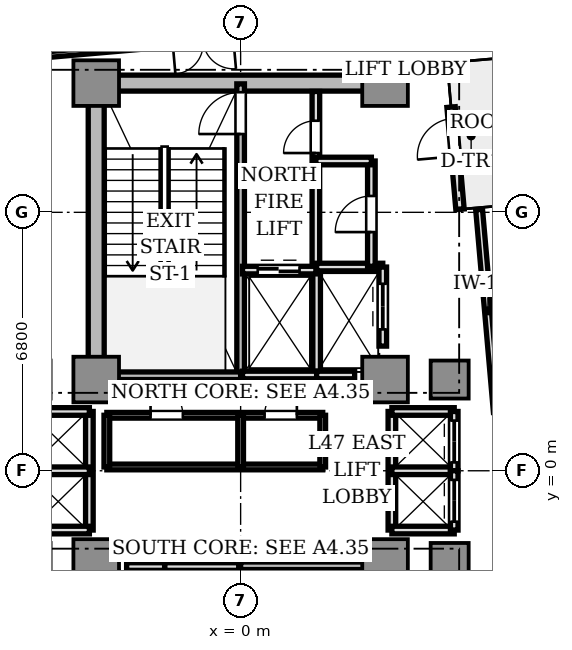
"""IFC4 building model, lengths in metres.
Left out: names, types, materials, properties, quantities, classifications, styles, units other than length and angle.
Written with IfcOpenShell. Run it as: python <this file> out.ifc"""

import sys

from ifc_helpers import new_model, si_unit, direction, frame, frame_2d, origin, origin_2d, place, context, subcontext, project, spatial, rectangle, extrude, source, transform, mapped, element, fill, save


model = new_model("IFC4")
c1 = context("Model", 3, precision=1e-05, world=origin(), true_north=direction((0.0, 1.0)))
c2 = subcontext(c1, "Body", "Model", "MODEL_VIEW")
j1 = project(units=[si_unit("LENGTHUNIT", "METRE"), si_unit("PLANEANGLEUNIT", "RADIAN")], contexts=[c1])
p1 = place(None, origin())
s1 = spatial("IfcSite", under=j1, at=p1, CompositionType="ELEMENT")
p2 = place(p1, origin())
s2 = spatial("IfcBuilding", under=s1, at=p2, CompositionType="ELEMENT")
p3 = place(p2, frame((0.0, 0.0, 170.7)))
s3 = spatial("IfcBuildingStorey", under=s2, at=p3, CompositionType="ELEMENT", Elevation=170.7)
p4 = place(p3, frame((-3.55, 10.2, 0.0), z_axis=(0.0, 0.0, 1.0), x_axis=(1.0, 0.0, 0.0)))
e1 = element("IfcWall", 1, at=p4, inside=s3, PredefinedType="SHEAR", context=c2, shape_type="SweptSolid", body=[
    extrude(rectangle(XDim=7.1, YDim=0.42, at=frame_2d((3.55, 0.0))), origin(), (0.0, 0.0, 1.0), 4.26),
])
p5 = place(p3, frame((-3.8, 2.85, 0.0), z_axis=(0.0, 0.0, 1.0), x_axis=(0.0, 1.0, 0.0)))
e2 = element("IfcWall", 2, at=p5, inside=s3, PredefinedType="SHEAR", context=c2, shape_type="SweptSolid", body=[
    extrude(rectangle(XDim=6.9, YDim=0.42, at=frame_2d((3.45, 0.0))), origin(), (0.0, 0.0, 1.0), 4.26),
])
m1 = source(origin(), c2, "Body", "SweptSolid", [
    extrude(rectangle(XDim=1.2, YDim=1.2, at=origin_2d()), origin(), (0.0, 0.0, 1.0), 4.26),
])
for number, where, z_axis, x_axis in (
    (3, (-3.8, 2.4, 0.0), (0.0, 0.0, 1.0), (1.0, 0.0, 0.0)),
    (4, (3.8, 2.4, 0.0), (0.0, 0.0, 1.0), (1.0, 0.0, 0.0)),
    (5, (-3.8, 10.2, 0.0), (0.0, 0.0, 1.0), (1.0, 0.0, 0.0)),
    (6, (3.8, 10.2, 0.0), (0.0, 0.0, 1.0), (1.0, 0.0, 0.0)),
    (7, (-3.8, -2.4, 0.0), (0.0, 0.0, 1.0), (1.0, 0.0, 0.0)),
    (8, (3.8, -2.4, 0.0), (0.0, 0.0, 1.0), (1.0, 0.0, 0.0)),
):
    element("IfcColumn", number, at=place(p3, frame(where, z_axis=z_axis, x_axis=x_axis)), inside=s3, PredefinedType="COLUMN", context=c2, shape_type="MappedRepresentation", body=[
        mapped(m1, transform((0.0, 0.0, 0.0), scale=1.0)),
    ])
m2 = source(origin(), c2, "Body", "SweptSolid", [
    extrude(rectangle(XDim=1.0, YDim=1.0, at=origin_2d()), origin(), (0.0, 0.0, 1.0), 4.26),
])
for number, where, z_axis, x_axis in (
    (9, (5.5, 2.4, 0.0), (0.0, 0.0, 1.0), (1.0, 0.0, 0.0)),
    (10, (5.5, -2.4, 0.0), (0.0, 0.0, 1.0), (1.0, 0.0, 0.0)),
):
    element("IfcColumn", number, at=place(p3, frame(where, z_axis=z_axis, x_axis=x_axis)), inside=s3, PredefinedType="COLUMN", context=c2, shape_type="MappedRepresentation", body=[
        mapped(m2, transform((0.0, 0.0, 0.0), scale=1.0)),
    ])
p6 = place(p3, frame((5.772, 6.879, 0.0), z_axis=(0.0, 0.0, 1.0), x_axis=(-0.087168071984, 0.996193619346, 0.0)))
e11 = element("IfcWall", 11, at=p6, inside=s3, PredefinedType="STANDARD", context=c2, shape_type="SweptSolid", body=[
    extrude(rectangle(XDim=2.7, YDim=0.22, at=frame_2d((1.35, 0.0))), origin(), (0.0, 0.0, 1.0), 4.26),
])
p7 = place(p6, frame((1.4, 0.0, 0.0)))
e12 = element("IfcOpeningElement", 12, at=p7, cuts=e11, PredefinedType="OPENING", context=c2, shape_type="SweptSolid", body=[
    extrude(rectangle(XDim=1.0, YDim=2.2, at=frame_2d((0.5, 1.1))), frame((0.0, 0.12, 0.0), z_axis=(0.0, -1.0, 0.0), x_axis=(1.0, 0.0, 0.0)), (0.0, 0.0, 1.0), 0.24),
])
p8 = place(p3, frame((0.0, 2.5, 0.0), z_axis=(0.0, 0.0, 1.0), x_axis=(0.0, 1.0, 0.0)))
e13 = element("IfcWall", 13, at=p8, inside=s3, PredefinedType="SOLIDWALL", context=c2, shape_type="SweptSolid", body=[
    extrude(rectangle(XDim=7.68, YDim=0.2, at=frame_2d((3.84, 0.0))), origin(), (0.0, 0.0, 1.0), 4.26),
])
p9 = place(p8, frame((6.36, 0.0, 0.0)))
e14 = element("IfcOpeningElement", 14, at=p9, cuts=e13, PredefinedType="OPENING", context=c2, shape_type="SweptSolid", body=[
    extrude(rectangle(XDim=1.1, YDim=2.15, at=frame_2d((0.55, 1.075))), frame((0.0, 0.11, 0.0), z_axis=(0.0, -1.0, 0.0), x_axis=(1.0, 0.0, 0.0)), (0.0, 0.0, 1.0), 0.22),
])
p10 = place(p3, frame((-3.72, 2.5, 0.0), z_axis=(0.0, 0.0, 1.0), x_axis=(1.0, 0.0, 0.0)))
e15 = element("IfcWall", 15, at=p10, inside=s3, PredefinedType="SOLIDWALL", context=c2, shape_type="SweptSolid", body=[
    extrude(rectangle(XDim=3.72, YDim=0.2, at=frame_2d((1.86, 0.0))), origin(), (0.0, 0.0, 1.0), 4.26),
])
p11 = place(p3, frame((0.0, -10.18, 0.0), z_axis=(0.0, 0.0, 1.0), x_axis=(0.0, 1.0, 0.0)))
e16 = element("IfcWall", 16, at=p11, inside=s3, PredefinedType="SOLIDWALL", context=c2, shape_type="SweptSolid", body=[
    extrude(rectangle(XDim=7.68, YDim=0.2, at=frame_2d((3.84, 0.0))), origin(), (0.0, 0.0, 1.0), 4.26),
])
p12 = place(p11, frame((0.28, 0.0, 0.0)))
e17 = element("IfcOpeningElement", 17, at=p12, cuts=e16, PredefinedType="OPENING", context=c2, shape_type="SweptSolid", body=[
    extrude(rectangle(XDim=1.1, YDim=2.15, at=frame_2d((0.55, 1.075))), frame((0.0, 0.11, 0.0), z_axis=(0.0, -1.0, 0.0), x_axis=(1.0, 0.0, 0.0)), (0.0, 0.0, 1.0), 0.22),
])
p13 = place(p3, frame((0.0, -2.5, 0.0), z_axis=(0.0, 0.0, 1.0), x_axis=(1.0, 0.0, 0.0)))
e18 = element("IfcWall", 18, at=p13, inside=s3, PredefinedType="SOLIDWALL", context=c2, shape_type="SweptSolid", body=[
    extrude(rectangle(XDim=3.72, YDim=0.2, at=frame_2d((1.86, 0.0))), origin(), (0.0, 0.0, 1.0), 4.26),
])
p14 = place(p3, frame((1.98, 5.32, 0.0), z_axis=(0.0, 0.0, 1.0), x_axis=(0.0, 1.0, 0.0)))
e19 = element("IfcWall", 19, at=p14, inside=s3, PredefinedType="SOLIDWALL", context=c2, shape_type="SweptSolid", body=[
    extrude(rectangle(XDim=4.66, YDim=0.2, at=frame_2d((2.33, 0.0))), origin(), (0.0, 0.0, 1.0), 3.81),
])
p15 = place(p14, frame((3.04, 0.0, 0.0)))
e20 = element("IfcOpeningElement", 20, at=p15, cuts=e19, PredefinedType="OPENING", context=c2, shape_type="SweptSolid", body=[
    extrude(rectangle(XDim=0.85, YDim=2.1, at=frame_2d((0.425, 1.05))), frame((0.0, 0.11, 0.0), z_axis=(0.0, -1.0, 0.0), x_axis=(1.0, 0.0, 0.0)), (0.0, 0.0, 1.0), 0.22),
])
p16 = place(p3, frame((2.0, 2.5, 0.0), z_axis=(0.0, 0.0, 1.0), x_axis=(0.0, 1.0, 0.0)))
e21 = element("IfcWall", 21, at=p16, inside=s3, PredefinedType="SOLIDWALL", context=c2, shape_type="SweptSolid", body=[
    extrude(rectangle(XDim=2.78, YDim=0.2, at=frame_2d((1.39, 0.0))), origin(), (0.0, 0.0, 1.0), 3.81),
])
p17 = place(p3, frame((0.05, 2.52, 0.0), z_axis=(0.0, 0.0, 1.0), x_axis=(1.0, 0.0, 0.0)))
e22 = element("IfcWall", 22, at=p17, inside=s3, PredefinedType="SOLIDWALL", context=c2, shape_type="SweptSolid", body=[
    extrude(rectangle(XDim=1.95, YDim=0.2, at=frame_2d((0.975, 0.0))), origin(), (0.0, 0.0, 1.0), 3.81),
])
p18 = place(p3, frame((0.05, 5.28, 0.0), z_axis=(0.0, 0.0, 1.0), x_axis=(1.0, 0.0, 0.0)))
e23 = element("IfcWall", 23, at=p18, inside=s3, PredefinedType="SOLIDWALL", context=c2, shape_type="SweptSolid", body=[
    extrude(rectangle(XDim=1.93, YDim=0.2, at=frame_2d((0.965, 0.0))), origin(), (0.0, 0.0, 1.0), 3.81),
])
p19 = place(p18, frame((0.4, 0.0, 0.0)))
e24 = element("IfcOpeningElement", 24, at=p19, cuts=e23, PredefinedType="OPENING", context=c2, shape_type="SweptSolid", body=[
    extrude(rectangle(XDim=1.1, YDim=2.2, at=frame_2d((0.55, 1.1))), frame((0.0, 0.11, 0.0), z_axis=(0.0, -1.0, 0.0), x_axis=(1.0, 0.0, 0.0)), (0.0, 0.0, 1.0), 0.22),
])
p20 = place(p3, frame((-2.0, -5.28, 0.0), z_axis=(0.0, 0.0, 1.0), x_axis=(0.0, 1.0, 0.0)))
e25 = element("IfcWall", 25, at=p20, inside=s3, PredefinedType="SOLIDWALL", context=c2, shape_type="SweptSolid", body=[
    extrude(rectangle(XDim=2.78, YDim=0.2, at=frame_2d((1.39, 0.0))), origin(), (0.0, 0.0, 1.0), 3.81),
])
p21 = place(p3, frame((-2.0, -2.52, 0.0), z_axis=(0.0, 0.0, 1.0), x_axis=(1.0, 0.0, 0.0)))
e26 = element("IfcWall", 26, at=p21, inside=s3, PredefinedType="SOLIDWALL", context=c2, shape_type="SweptSolid", body=[
    extrude(rectangle(XDim=1.95, YDim=0.2, at=frame_2d((0.975, 0.0))), origin(), (0.0, 0.0, 1.0), 3.81),
])
p22 = place(p3, frame((2.0, 2.52, 0.0), z_axis=(0.0, 0.0, 1.0), x_axis=(1.0, 0.0, 0.0)))
e27 = element("IfcWall", 27, at=p22, inside=s3, PredefinedType="SOLIDWALL", context=c2, shape_type="SweptSolid", body=[
    extrude(rectangle(XDim=1.0, YDim=0.2, at=frame_2d((0.5, 0.0))), origin(), (0.0, 0.0, 1.0), 3.81),
])
p23 = place(p3, frame((2.0, 5.36, 0.0), z_axis=(0.0, 0.0, 1.0), x_axis=(1.0, 0.0, 0.0)))
e28 = element("IfcWall", 28, at=p23, inside=s3, PredefinedType="SOLIDWALL", context=c2, shape_type="SweptSolid", body=[
    extrude(rectangle(XDim=1.74, YDim=0.2, at=frame_2d((0.87, 0.0))), origin(), (0.0, 0.0, 1.0), 3.81),
])
p24 = place(p3, frame((3.74, 3.28, 0.0), z_axis=(0.0, 0.0, 1.0), x_axis=(0.0, 1.0, 0.0)))
e29 = element("IfcWall", 29, at=p24, inside=s3, PredefinedType="SOLIDWALL", context=c2, shape_type="SweptSolid", body=[
    extrude(rectangle(XDim=2.08, YDim=0.2, at=frame_2d((1.04, 0.0))), origin(), (0.0, 0.0, 1.0), 3.81),
])
p25 = place(p24, frame((0.44, 0.0, 0.0)))
e30 = element("IfcOpeningElement", 30, at=p25, cuts=e29, PredefinedType="OPENING", context=c2, shape_type="SweptSolid", body=[
    extrude(rectangle(XDim=1.2, YDim=2.2, at=frame_2d((0.6, 1.1))), frame((0.0, 0.11, 0.0), z_axis=(0.0, -1.0, 0.0), x_axis=(1.0, 0.0, 0.0)), (0.0, 0.0, 1.0), 0.22),
])
p26 = place(p3, frame((-3.0, -2.52, 0.0), z_axis=(0.0, 0.0, 1.0), x_axis=(1.0, 0.0, 0.0)))
e31 = element("IfcWall", 31, at=p26, inside=s3, PredefinedType="SOLIDWALL", context=c2, shape_type="SweptSolid", body=[
    extrude(rectangle(XDim=1.0, YDim=0.2, at=frame_2d((0.5, 0.0))), origin(), (0.0, 0.0, 1.0), 3.81),
])
p27 = place(p3, frame((3.98, -1.56, 0.0), z_axis=(0.0, 0.0, 1.0), x_axis=(0.0, 1.0, 0.0)))
e32 = element("IfcWall", 32, at=p27, inside=s3, PredefinedType="SOLIDWALL", context=c2, shape_type="SweptSolid", body=[
    extrude(rectangle(XDim=3.12, YDim=0.2, at=frame_2d((1.56, 0.0))), origin(), (0.0, 0.0, 1.0), 3.43),
])
for number, where, z_axis, x_axis in (
    (33, (3.98, 1.56, 0.0), (0.0, 0.0, 1.0), (1.0, 0.0, 0.0)),
    (34, (3.98, -1.56, 0.0), (0.0, 0.0, 1.0), (1.0, 0.0, 0.0)),
    (35, (3.98, 0.0, 0.0), (0.0, 0.0, 1.0), (1.0, 0.0, 0.0)),
):
    element("IfcWall", number, at=place(p3, frame(where, z_axis=z_axis, x_axis=x_axis)), inside=s3, PredefinedType="SOLIDWALL", context=c2, shape_type="SweptSolid", body=[
        extrude(rectangle(XDim=1.64, YDim=0.2, at=frame_2d((0.82, 0.0))), origin(), (0.0, 0.0, 1.0), 3.81),
    ])
p28 = place(p3, frame((5.62, 0.0, 0.0), z_axis=(0.0, 0.0, 1.0), x_axis=(0.0, 1.0, 0.0)))
e36 = element("IfcWall", 36, at=p28, inside=s3, PredefinedType="SOLIDWALL", context=c2, shape_type="SweptSolid", body=[
    extrude(rectangle(XDim=1.56, YDim=0.2, at=frame_2d((0.78, 0.0))), origin(), (0.0, 0.0, 1.0), 3.81),
])
p29 = place(p28, frame((0.22, 0.0, 0.0)))
e37 = element("IfcOpeningElement", 37, at=p29, cuts=e36, PredefinedType="OPENING", context=c2, shape_type="SweptSolid", body=[
    extrude(rectangle(XDim=1.1, YDim=2.2, at=frame_2d((0.55, 1.1))), frame((0.0, 0.11, 0.0), z_axis=(0.0, -1.0, 0.0), x_axis=(1.0, 0.0, 0.0)), (0.0, 0.0, 1.0), 0.22),
])
p30 = place(p3, frame((5.62, -1.56, 0.0), z_axis=(0.0, 0.0, 1.0), x_axis=(0.0, 1.0, 0.0)))
e38 = element("IfcWall", 38, at=p30, inside=s3, PredefinedType="SOLIDWALL", context=c2, shape_type="SweptSolid", body=[
    extrude(rectangle(XDim=1.56, YDim=0.2, at=frame_2d((0.78, 0.0))), origin(), (0.0, 0.0, 1.0), 3.81),
])
p31 = place(p30, frame((0.22, 0.0, 0.0)))
e39 = element("IfcOpeningElement", 39, at=p31, cuts=e38, PredefinedType="OPENING", context=c2, shape_type="SweptSolid", body=[
    extrude(rectangle(XDim=1.1, YDim=2.2, at=frame_2d((0.55, 1.1))), frame((0.0, 0.11, 0.0), z_axis=(0.0, -1.0, 0.0), x_axis=(1.0, 0.0, 0.0)), (0.0, 0.0, 1.0), 0.22),
])
p32 = place(p3, frame((-3.98, -1.56, 0.0), z_axis=(0.0, 0.0, 1.0), x_axis=(0.0, 1.0, 0.0)))
e40 = element("IfcWall", 40, at=p32, inside=s3, PredefinedType="SOLIDWALL", context=c2, shape_type="SweptSolid", body=[
    extrude(rectangle(XDim=3.12, YDim=0.2, at=frame_2d((1.56, 0.0))), origin(), (0.0, 0.0, 1.0), 3.43),
])
for number, where, z_axis, x_axis in (
    (41, (-5.62, 1.56, 0.0), (0.0, 0.0, 1.0), (1.0, 0.0, 0.0)),
    (42, (-5.62, -1.56, 0.0), (0.0, 0.0, 1.0), (1.0, 0.0, 0.0)),
    (43, (-5.62, 0.0, 0.0), (0.0, 0.0, 1.0), (1.0, 0.0, 0.0)),
):
    element("IfcWall", number, at=place(p3, frame(where, z_axis=z_axis, x_axis=x_axis)), inside=s3, PredefinedType="SOLIDWALL", context=c2, shape_type="SweptSolid", body=[
        extrude(rectangle(XDim=1.64, YDim=0.2, at=frame_2d((0.82, 0.0))), origin(), (0.0, 0.0, 1.0), 3.81),
    ])
p33 = place(p3, frame((3.44, 5.38, 0.0), z_axis=(0.0, 0.0, 1.0), x_axis=(0.0, 1.0, 0.0)))
e44 = element("IfcWall", 44, at=p33, inside=s3, PredefinedType="SOLIDWALL", context=c2, shape_type="SweptSolid", body=[
    extrude(rectangle(XDim=2.77, YDim=0.2, at=frame_2d((1.385, 0.0))), origin(), (0.0, 0.0, 1.0), 3.81),
])
p34 = place(p33, frame((0.9, 0.0, 0.0)))
e45 = element("IfcOpeningElement", 45, at=p34, cuts=e44, PredefinedType="OPENING", context=c2, shape_type="SweptSolid", body=[
    extrude(rectangle(XDim=0.95, YDim=2.15, at=frame_2d((0.475, 1.075))), frame((0.0, 0.11, 0.0), z_axis=(0.0, -1.0, 0.0), x_axis=(1.0, 0.0, 0.0)), (0.0, 0.0, 1.0), 0.22),
])
p35 = place(p3, frame((1.98, 8.15, 0.0), z_axis=(0.0, 0.0, 1.0), x_axis=(1.0, 0.0, 0.0)))
e46 = element("IfcWall", 46, at=p35, inside=s3, PredefinedType="SOLIDWALL", context=c2, shape_type="SweptSolid", body=[
    extrude(rectangle(XDim=1.46, YDim=0.2, at=frame_2d((0.73, 0.0))), origin(), (0.0, 0.0, 1.0), 3.81),
])
p36 = place(p3, frame((-3.52, 0.1, 0.0), z_axis=(0.0, 0.0, 1.0), x_axis=(1.0, 0.0, 0.0)))
e47 = element("IfcWall", 47, at=p36, inside=s3, PredefinedType="PARTITIONING", context=c2, shape_type="SweptSolid", body=[
    extrude(rectangle(XDim=5.68, YDim=0.15, at=frame_2d((2.84, 0.0))), origin(), (0.0, 0.0, 1.0), 3.81),
])
p37 = place(p3, frame((-3.52, 1.46, 0.0), z_axis=(0.0, 0.0, 1.0), x_axis=(1.0, 0.0, 0.0)))
e48 = element("IfcWall", 48, at=p37, inside=s3, PredefinedType="PARTITIONING", context=c2, shape_type="SweptSolid", body=[
    extrude(rectangle(XDim=5.68, YDim=0.15, at=frame_2d((2.84, 0.0))), origin(), (0.0, 0.0, 1.0), 3.81),
])
p38 = place(p37, frame((1.15, 0.0, 0.0)))
e49 = element("IfcOpeningElement", 49, at=p38, cuts=e48, PredefinedType="OPENING", context=c2, shape_type="SweptSolid", body=[
    extrude(rectangle(XDim=0.85, YDim=2.1, at=frame_2d((0.425, 1.05))), frame((0.0, 0.085, 0.0), z_axis=(0.0, -1.0, 0.0), x_axis=(1.0, 0.0, 0.0)), (0.0, 0.0, 1.0), 0.17),
])
p39 = place(p37, frame((4.15, 0.0, 0.0)))
e50 = element("IfcOpeningElement", 50, at=p39, cuts=e48, PredefinedType="OPENING", context=c2, shape_type="SweptSolid", body=[
    extrude(rectangle(XDim=0.85, YDim=2.1, at=frame_2d((0.425, 1.05))), frame((0.0, 0.085, 0.0), z_axis=(0.0, -1.0, 0.0), x_axis=(1.0, 0.0, 0.0)), (0.0, 0.0, 1.0), 0.17),
])
p40 = place(p3, frame((-3.52, 0.1, 0.0), z_axis=(0.0, 0.0, 1.0), x_axis=(0.0, 1.0, 0.0)))
e51 = element("IfcWall", 51, at=p40, inside=s3, PredefinedType="PARTITIONING", context=c2, shape_type="SweptSolid", body=[
    extrude(rectangle(XDim=1.36, YDim=0.15, at=frame_2d((0.68, 0.0))), origin(), (0.0, 0.0, 1.0), 3.43),
])
for number, where, z_axis, x_axis in (
    (52, (2.16, 0.1, 0.0), (0.0, 0.0, 1.0), (0.0, 1.0, 0.0)),
    (53, (0.0, 0.1, 0.0), (0.0, 0.0, 1.0), (0.0, 1.0, 0.0)),
):
    element("IfcWall", number, at=place(p3, frame(where, z_axis=z_axis, x_axis=x_axis)), inside=s3, PredefinedType="PARTITIONING", context=c2, shape_type="SweptSolid", body=[
        extrude(rectangle(XDim=1.36, YDim=0.15, at=frame_2d((0.68, 0.0))), origin(), (0.0, 0.0, 1.0), 3.81),
    ])
p41 = place(p3, frame((6.741, 1.543, 0.0), z_axis=(0.0, 0.0, 1.0), x_axis=(-0.087161289348, 0.996194212812, 0.0)))
e54 = element("IfcWall", 54, at=p41, inside=s3, PredefinedType="PARTITIONING", context=c2, shape_type="SweptSolid", body=[
    extrude(rectangle(XDim=5.35, YDim=0.18, at=frame_2d((2.675, 0.0))), origin(), (0.0, 0.0, 1.0), 3.81),
])
p42 = place(p3, frame((5.287, 11.856, 0.0), z_axis=(0.0, 0.0, 1.0), x_axis=(-0.996194790044, -0.087154691724, 0.0)))
e55 = element("IfcWall", 55, at=p42, inside=s3, PredefinedType="PARTITIONING", context=c2, shape_type="SweptSolid", body=[
    extrude(rectangle(XDim=12.6, YDim=0.15, at=frame_2d((6.3, 0.0))), origin(), (0.0, 0.0, 1.0), 3.81),
])
p43 = place(p42, frame((5.5, 0.0, 0.0)))
e56 = element("IfcOpeningElement", 56, at=p43, cuts=e55, PredefinedType="OPENING", context=c2, shape_type="SweptSolid", body=[
    extrude(rectangle(XDim=1.6, YDim=2.25, at=frame_2d((0.8, 1.125))), frame((0.0, 0.085, 0.0), z_axis=(0.0, -1.0, 0.0), x_axis=(1.0, 0.0, 0.0)), (0.0, 0.0, 1.0), 0.17),
])
m3 = source(origin(), c2, "Body", "SweptSolid", [
    extrude(rectangle(XDim=1.0, YDim=0.05, at=origin_2d()), origin(), (0.0, 0.0, 1.0), 2.2),
])
p44 = place(p7, frame((0.5, 0.0, 0.0)))
e57 = element("IfcDoor", 57, at=p44, inside=s3, OperationType="SINGLE_SWING_LEFT", PredefinedType="DOOR", context=c2, shape_type="MappedRepresentation", body=[
    mapped(m3, transform((0.0, 0.0, 0.0), scale=1.0)),
])
fill(e12, e57)
m4 = source(origin(), c2, "Body", "SweptSolid", [
    extrude(rectangle(XDim=1.1, YDim=0.05, at=origin_2d()), origin(), (0.0, 0.0, 1.0), 2.15),
])
p45 = place(p9, frame((0.55, 0.0, 0.0)))
e58 = element("IfcDoor", 58, at=p45, inside=s3, OperationType="SINGLE_SWING_LEFT", PredefinedType="DOOR", context=c2, shape_type="MappedRepresentation", body=[
    mapped(m4, transform((0.0, 0.0, 0.0), scale=1.0)),
])
fill(e14, e58)
m5 = source(origin(), c2, "Body", "SweptSolid", [
    extrude(rectangle(XDim=0.85, YDim=0.05, at=origin_2d()), origin(), (0.0, 0.0, 1.0), 2.1),
])
p46 = place(p15, frame((0.425, 0.0, 0.0)))
e59 = element("IfcDoor", 59, at=p46, inside=s3, OperationType="SINGLE_SWING_LEFT", PredefinedType="DOOR", context=c2, shape_type="MappedRepresentation", body=[
    mapped(m5, transform((0.0, 0.0, 0.0), scale=1.0)),
])
fill(e20, e59)
m6 = source(origin(), c2, "Body", "SweptSolid", [
    extrude(rectangle(XDim=1.1, YDim=0.05, at=origin_2d()), origin(), (0.0, 0.0, 1.0), 2.2),
])
p47 = place(p19, frame((0.55, 0.0, 0.0)))
e60 = element("IfcDoor", 60, at=p47, inside=s3, OperationType="DOUBLE_DOOR_SLIDING", PredefinedType="DOOR", context=c2, shape_type="MappedRepresentation", body=[
    mapped(m6, transform((0.0, 0.0, 0.0), scale=1.0)),
])
fill(e24, e60)
m7 = source(origin(), c2, "Body", "SweptSolid", [
    extrude(rectangle(XDim=1.2, YDim=0.05, at=origin_2d()), origin(), (0.0, 0.0, 1.0), 2.2),
])
p48 = place(p25, frame((0.6, 0.0, 0.0)))
e61 = element("IfcDoor", 61, at=p48, inside=s3, OperationType="DOUBLE_DOOR_SLIDING", PredefinedType="DOOR", context=c2, shape_type="MappedRepresentation", body=[
    mapped(m7, transform((0.0, 0.0, 0.0), scale=1.0)),
])
fill(e30, e61)
p49 = place(p29, frame((0.55, 0.0, 0.0)))
e62 = element("IfcDoor", 62, at=p49, inside=s3, OperationType="DOUBLE_DOOR_SLIDING", PredefinedType="DOOR", context=c2, shape_type="MappedRepresentation", body=[
    mapped(m6, transform((0.0, 0.0, 0.0), scale=1.0)),
])
fill(e37, e62)
p50 = place(p31, frame((0.55, 0.0, 0.0)))
e63 = element("IfcDoor", 63, at=p50, inside=s3, OperationType="DOUBLE_DOOR_SLIDING", PredefinedType="DOOR", context=c2, shape_type="MappedRepresentation", body=[
    mapped(m6, transform((0.0, 0.0, 0.0), scale=1.0)),
])
fill(e39, e63)
m8 = source(origin(), c2, "Body", "SweptSolid", [
    extrude(rectangle(XDim=0.95, YDim=0.05, at=origin_2d()), origin(), (0.0, 0.0, 1.0), 2.15),
])
p51 = place(p34, frame((0.475, 0.0, 0.0)))
e64 = element("IfcDoor", 64, at=p51, inside=s3, OperationType="SINGLE_SWING_LEFT", PredefinedType="DOOR", context=c2, shape_type="MappedRepresentation", body=[
    mapped(m8, transform((0.0, 0.0, 0.0), scale=1.0)),
])
fill(e45, e64)
p52 = place(p38, frame((0.425, 0.0, 0.0)))
e65 = element("IfcDoor", 65, at=p52, inside=s3, OperationType="SINGLE_SWING_LEFT", PredefinedType="DOOR", context=c2, shape_type="MappedRepresentation", body=[
    mapped(m5, transform((0.0, 0.0, 0.0), scale=1.0)),
])
fill(e49, e65)
p53 = place(p39, frame((0.425, 0.0, 0.0)))
e66 = element("IfcDoor", 66, at=p53, inside=s3, OperationType="SINGLE_SWING_RIGHT", PredefinedType="DOOR", context=c2, shape_type="MappedRepresentation", body=[
    mapped(m5, transform((0.0, 0.0, 0.0), scale=1.0)),
])
fill(e50, e66)
save(model, sys.argv[1])
